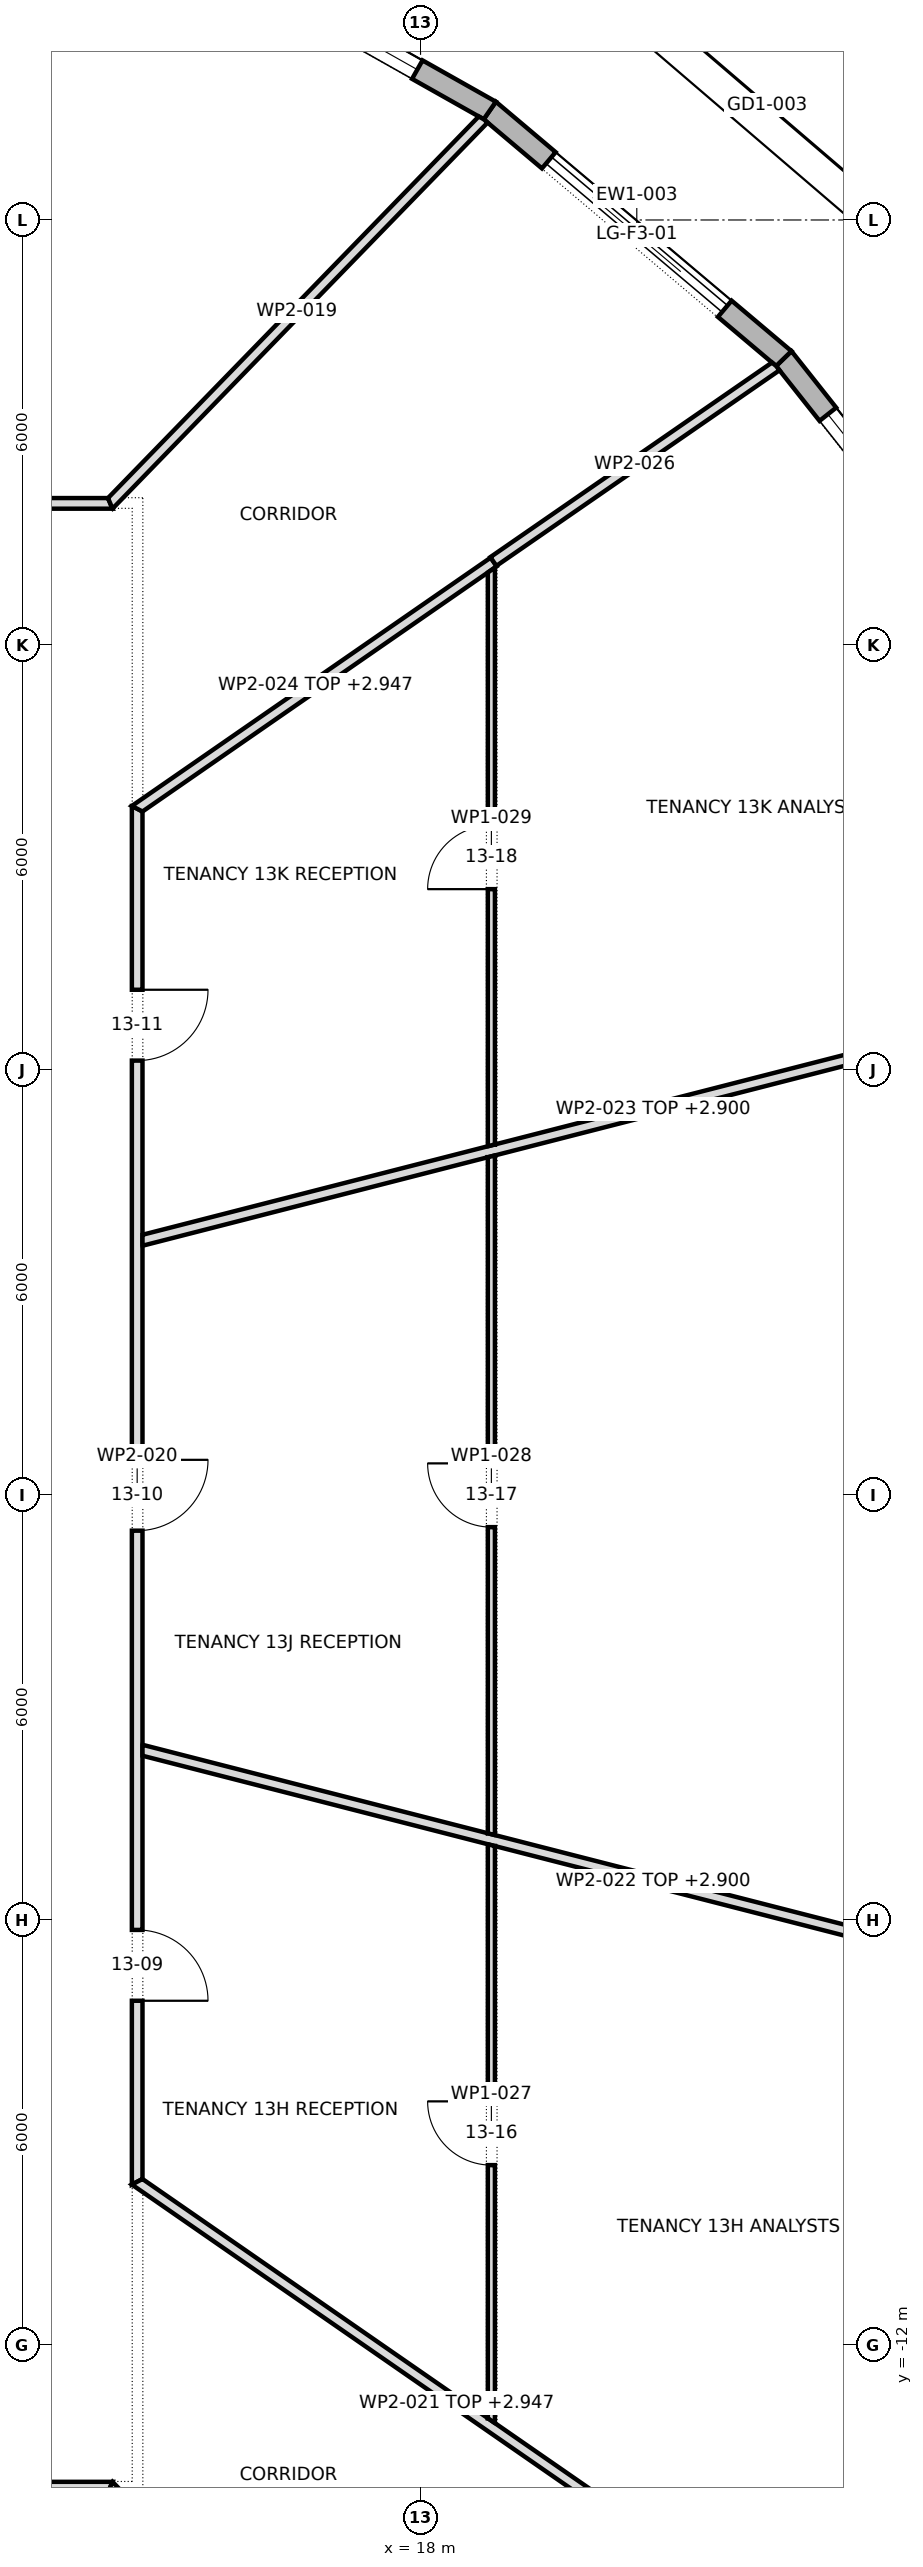
"""IFC4 building model, lengths in metres.
Left out: names, types, materials, properties, quantities, classifications, styles, units other than length and angle.
Written with IfcOpenShell. Run it as: python <this file> out.ifc"""

import sys

from ifc_helpers import new_model, si_unit, direction, frame, frame_2d, origin, place, context, subcontext, project, spatial, polyline, rectangle, outline, extrude, element, fill, save


model = new_model("IFC4")
c1 = context("Model", 3, precision=1e-05, world=origin(), true_north=direction((0.0, 1.0)))
c2 = subcontext(c1, "Body", "Model", "MODEL_VIEW")
j1 = project(units=[si_unit("LENGTHUNIT", "METRE"), si_unit("PLANEANGLEUNIT", "RADIAN")], contexts=[c1])
p1 = place(None, origin())
s1 = spatial("IfcSite", under=j1, at=p1, CompositionType="ELEMENT")
p2 = place(p1, origin())
s2 = spatial("IfcBuilding", under=s1, at=p2, CompositionType="ELEMENT")
p3 = place(p2, frame((0.0, 0.0, 198.9)))
s3 = spatial("IfcBuildingStorey", under=s2, at=p3, CompositionType="ELEMENT", Elevation=198.9)
p4 = place(p3, frame((26.39, 11.924, 0.0), z_axis=(0.0, 0.0, 1.0), x_axis=(-0.620829074232, 0.783945955145, 0.0)))
e1 = element("IfcWall", 1, at=p4, inside=s3, PredefinedType="STANDARD", context=c2, shape_type="SweptSolid", body=[
    extrude(outline(polyline([(-0.016, -0.15), (5.27, -0.15), (5.24, 0.15), (0.016, 0.15), (-0.016, -0.15)])), origin(), (0.0, 0.0, 1.0), 3.7),
])
p5 = place(p4, frame((1.003, 0.0, 0.6)))
e2 = element("IfcOpeningElement", 2, at=p5, cuts=e1, PredefinedType="OPENING", context=c2, shape_type="SweptSolid", body=[
    extrude(rectangle(XDim=3.25, YDim=2.65, at=frame_2d((1.625, 1.325))), frame((0.0, 0.162, 0.0), z_axis=(0.0, -1.0, 0.0), x_axis=(1.0, 0.0, 0.0)), (0.0, 0.0, 1.0), 0.324),
])
p6 = place(p3, frame((23.128, 16.044, 0.0), z_axis=(0.0, 0.0, 1.0), x_axis=(-0.764330261608, 0.644824977176, 0.0)))
e3 = element("IfcWall", 3, at=p6, inside=s3, PredefinedType="STANDARD", context=c2, shape_type="SweptSolid", body=[
    extrude(outline(polyline([(-0.015, -0.15), (5.444, -0.15), (5.416, 0.15), (0.015, 0.15), (-0.015, -0.15)])), origin(), (0.0, 0.0, 1.0), 3.7),
])
p7 = place(p6, frame((1.09, 0.0, 0.0)))
e4 = element("IfcOpeningElement", 4, at=p7, cuts=e3, PredefinedType="OPENING", context=c2, shape_type="SweptSolid", body=[
    extrude(rectangle(XDim=3.25, YDim=3.25, at=frame_2d((1.625, 1.625))), frame((0.0, 0.162, 0.0), z_axis=(0.0, -1.0, 0.0), x_axis=(1.0, 0.0, 0.0)), (0.0, 0.0, 1.0), 0.324),
])
p8 = place(p3, frame((18.977, 19.545, 0.0), z_axis=(0.0, 0.0, 1.0), x_axis=(-0.871083701819, 0.491134588912, 0.0)))
e5 = element("IfcWall", 5, at=p8, inside=s3, PredefinedType="STANDARD", context=c2, shape_type="SweptSolid", body=[
    extrude(outline(polyline([(-0.014, -0.15), (5.613, -0.15), (5.586, 0.15), (0.014, 0.15), (-0.014, -0.15)])), origin(), (0.0, 0.0, 1.0), 3.7),
])
p9 = place(p8, frame((1.175, 0.0, 0.6)))
e6 = element("IfcOpeningElement", 6, at=p9, cuts=e5, PredefinedType="OPENING", context=c2, shape_type="SweptSolid", body=[
    extrude(rectangle(XDim=3.25, YDim=2.65, at=frame_2d((1.625, 1.325))), frame((0.0, 0.162, 0.0), z_axis=(0.0, -1.0, 0.0), x_axis=(1.0, 0.0, 0.0)), (0.0, 0.0, 1.0), 0.324),
])
p10 = place(p3, frame((23.128, -16.044, 0.0), z_axis=(0.0, 0.0, 1.0), x_axis=(0.620829074232, 0.783945955145, 0.0)))
e7 = element("IfcWall", 7, at=p10, inside=s3, PredefinedType="STANDARD", context=c2, shape_type="SweptSolid", body=[
    extrude(outline(polyline([(-0.015, -0.15), (5.271, -0.15), (5.239, 0.15), (0.015, 0.15), (-0.015, -0.15)])), origin(), (0.0, 0.0, 1.0), 3.7),
])
p11 = place(p10, frame((1.003, 0.0, 0.6)))
e8 = element("IfcOpeningElement", 8, at=p11, cuts=e7, PredefinedType="OPENING", context=c2, shape_type="SweptSolid", body=[
    extrude(rectangle(XDim=3.25, YDim=2.65, at=frame_2d((1.625, 1.325))), frame((0.0, 0.162, 0.0), z_axis=(0.0, -1.0, 0.0), x_axis=(1.0, 0.0, 0.0)), (0.0, 0.0, 1.0), 0.324),
])
p12 = place(p3, frame((-13.652, 14.0, 0.0), z_axis=(0.0, 0.0, 1.0), x_axis=(1.0, 0.0, 0.0)))
e9 = element("IfcWall", 9, at=p12, inside=s3, PredefinedType="PARTITIONING", context=c2, shape_type="SweptSolid", body=[
    extrude(outline(polyline([(27.303, -0.075), (27.303, -0.075), (27.24, 0.075), (25.299, 0.075), (23.358, 0.075), (21.416, 0.075), (19.475, 0.075), (17.534, 0.075), (15.593, 0.075), (13.652, 0.075), (11.71, 0.075), (9.769, 0.075), (7.828, 0.075), (5.887, 0.075), (3.946, 0.075), (2.004, 0.075), (0.063, 0.075), (0.0, -0.075), (0.0, -0.075), (1.95, -0.075), (3.9, -0.075), (5.851, -0.075), (7.801, -0.075), (9.751, -0.075), (11.701, -0.075), (13.652, -0.075), (15.602, -0.075), (17.552, -0.075), (19.502, -0.075), (21.453, -0.075), (23.403, -0.075), (25.353, -0.075), (27.303, -0.075)])), origin(), (0.0, 0.0, 1.0), 3.7),
])
p13 = place(p12, frame((19.562, 0.0, 0.0)))
e10 = element("IfcOpeningElement", 10, at=p13, cuts=e9, PredefinedType="OPENING", context=c2, shape_type="SweptSolid", body=[
    extrude(rectangle(XDim=1.8, YDim=2.1, at=frame_2d((0.9, 1.05))), frame((0.0, 0.087, 0.0), z_axis=(0.0, -1.0, 0.0), x_axis=(1.0, 0.0, 0.0)), (0.0, 0.0, 1.0), 0.174),
])
p14 = place(p12, frame((5.942, 0.0, 0.0)))
e11 = element("IfcOpeningElement", 11, at=p14, cuts=e9, PredefinedType="OPENING", context=c2, shape_type="SweptSolid", body=[
    extrude(rectangle(XDim=1.8, YDim=2.1, at=frame_2d((0.9, 1.05))), frame((0.0, 0.087, 0.0), z_axis=(0.0, -1.0, 0.0), x_axis=(1.0, 0.0, 0.0)), (0.0, 0.0, 1.0), 0.174),
])
p15 = place(p3, frame((-1.63, -14.0, 0.0), z_axis=(0.0, 0.0, 1.0), x_axis=(1.0, 0.0, 0.0)))
e12 = element("IfcWall", 12, at=p15, inside=s3, PredefinedType="PARTITIONING", context=c2, shape_type="SweptSolid", body=[
    extrude(outline(polyline([(0.0, -0.075), (1.902, -0.075), (3.804, -0.075), (5.707, -0.075), (7.609, -0.075), (9.511, -0.075), (11.414, -0.075), (13.316, -0.075), (15.218, -0.075), (15.281, 0.075), (15.281, 0.075), (13.371, 0.075), (11.461, 0.075), (9.551, 0.075), (7.641, 0.075), (5.73, 0.075), (3.82, 0.075), (1.91, 0.075), (0.0, 0.075), (0.0, -0.075)])), origin(), (0.0, 0.0, 1.0), 3.7),
])
p16 = place(p15, frame((2.83, 0.0, 0.0)))
e13 = element("IfcOpeningElement", 13, at=p16, cuts=e12, PredefinedType="OPENING", context=c2, shape_type="SweptSolid", body=[
    extrude(rectangle(XDim=1.0, YDim=2.1, at=frame_2d((0.5, 1.05))), frame((0.0, 0.087, 0.0), z_axis=(0.0, -1.0, 0.0), x_axis=(1.0, 0.0, 0.0)), (0.0, 0.0, 1.0), 0.174),
])
p17 = place(p15, frame((10.455, 0.0, 0.0)))
e14 = element("IfcOpeningElement", 14, at=p17, cuts=e12, PredefinedType="OPENING", context=c2, shape_type="SweptSolid", body=[
    extrude(rectangle(XDim=1.0, YDim=2.1, at=frame_2d((0.5, 1.05))), frame((0.0, 0.087, 0.0), z_axis=(0.0, -1.0, 0.0), x_axis=(1.0, 0.0, 0.0)), (0.0, 0.0, 1.0), 0.174),
])
p18 = place(p3, frame((13.598, 13.977, 0.0), z_axis=(0.0, 0.0, 1.0), x_axis=(0.696864554069, 0.717202756048, 0.0)))
e15 = element("IfcWall", 15, at=p18, inside=s3, PredefinedType="PARTITIONING", context=c2, shape_type="SweptSolid", body=[
    extrude(outline(polyline([(7.599, -0.075), (7.599, -0.074), (7.594, -0.003), (7.573, 0.075), (5.696, 0.075), (3.818, 0.075), (1.941, 0.075), (0.063, 0.075), (0.032, 0.0), (0.0, -0.075), (1.9, -0.075), (3.799, -0.075), (5.699, -0.075), (7.599, -0.075)])), origin(), (0.0, 0.0, 1.0), 3.7),
])
p19 = place(p3, frame((14.0, -9.729, 0.0), z_axis=(0.0, 0.0, 1.0), x_axis=(0.0, 1.0, 0.0)))
e16 = element("IfcWall", 16, at=p19, inside=s3, PredefinedType="PARTITIONING", context=c2, shape_type="SweptSolid", body=[
    extrude(outline(polyline([(0.079, -0.075), (2.009, -0.075), (3.939, -0.075), (5.869, -0.075), (7.799, -0.075), (9.729, -0.075), (11.659, -0.075), (13.59, -0.075), (15.52, -0.075), (17.45, -0.075), (19.38, -0.075), (19.458, 0.075), (19.458, 0.075), (17.513, 0.075), (15.567, 0.075), (13.621, 0.075), (11.675, 0.075), (9.729, 0.075), (7.783, 0.075), (5.838, 0.075), (3.892, 0.075), (1.946, 0.075), (0.0, 0.075), (0.0, 0.075), (0.079, -0.075)])), origin(), (0.0, 0.0, 1.0), 3.7),
])
p20 = place(p19, frame((2.594, 0.0, 0.0)))
e17 = element("IfcOpeningElement", 17, at=p20, cuts=e16, PredefinedType="OPENING", context=c2, shape_type="SweptSolid", body=[
    extrude(rectangle(XDim=1.0, YDim=2.1, at=frame_2d((0.5, 1.05))), frame((0.0, 0.087, 0.0), z_axis=(0.0, -1.0, 0.0), x_axis=(1.0, 0.0, 0.0)), (0.0, 0.0, 1.0), 0.174),
])
p21 = place(p19, frame((9.229, 0.0, 0.0)))
e18 = element("IfcOpeningElement", 18, at=p21, cuts=e16, PredefinedType="OPENING", context=c2, shape_type="SweptSolid", body=[
    extrude(rectangle(XDim=1.0, YDim=2.1, at=frame_2d((0.5, 1.05))), frame((0.0, 0.087, 0.0), z_axis=(0.0, -1.0, 0.0), x_axis=(1.0, 0.0, 0.0)), (0.0, 0.0, 1.0), 0.174),
])
p22 = place(p19, frame((15.864, 0.0, 0.0)))
e19 = element("IfcOpeningElement", 19, at=p22, cuts=e16, PredefinedType="OPENING", context=c2, shape_type="SweptSolid", body=[
    extrude(rectangle(XDim=1.0, YDim=2.1, at=frame_2d((0.5, 1.05))), frame((0.0, 0.087, 0.0), z_axis=(0.0, -1.0, 0.0), x_axis=(1.0, 0.0, 0.0)), (0.0, 0.0, 1.0), 0.174),
])
p23 = place(p3, frame((13.968, -9.667, 0.0), z_axis=(0.0, 0.0, 1.0), x_axis=(0.822097241007, -0.569347105313, 0.0)))
e20 = element("IfcWall", 20, at=p23, inside=s3, PredefinedType="PARTITIONING", context=c2, shape_type="SweptSolid", body=[
    extrude(outline(polyline([(0.0, -0.075), (1.832, -0.075), (3.664, -0.075), (5.496, -0.075), (7.328, -0.075), (9.16, -0.075), (10.992, -0.075), (11.012, -0.002), (11.017, 0.07), (11.017, 0.075), (9.349, 0.075), (7.682, 0.075), (6.014, 0.075), (6.01, 0.072), (6.009, 0.075), (4.032, 0.075), (2.055, 0.075), (0.079, 0.075), (0.039, -0.0), (0.0, -0.075)])), origin(), (0.0, 0.0, 1.0), 2.947),
])
p24 = place(p3, frame((14.057, -3.594, 0.0), z_axis=(0.0, 0.0, 1.0), x_axis=(0.96870063855, -0.248231893342, 0.0)))
e21 = element("IfcWall", 21, at=p24, inside=s3, PredefinedType="PARTITIONING", context=c2, shape_type="SweptSolid", body=[
    extrude(outline(polyline([(0.038, -0.075), (1.748, -0.075), (3.458, -0.075), (5.168, -0.075), (5.174, -0.073), (5.174, -0.075), (7.117, -0.075), (9.061, -0.075), (11.004, -0.075), (12.947, -0.075), (14.89, -0.075), (14.904, -0.008), (14.904, 0.075), (12.931, 0.075), (10.958, 0.075), (8.985, 0.075), (7.011, 0.075), (5.038, 0.075), (5.033, 0.073), (5.032, 0.075), (3.355, 0.075), (1.677, 0.075), (0.0, 0.075), (0.0, 0.074), (0.038, -0.075)])), origin(), (0.0, 0.0, 1.0), 2.9),
])
p25 = place(p3, frame((14.057, 3.594, 0.0), z_axis=(0.0, 0.0, 1.0), x_axis=(0.96870063855, 0.248231893342, 0.0)))
e22 = element("IfcWall", 22, at=p25, inside=s3, PredefinedType="PARTITIONING", context=c2, shape_type="SweptSolid", body=[
    extrude(outline(polyline([(0.0, -0.075), (1.677, -0.075), (3.355, -0.075), (5.032, -0.075), (5.033, -0.073), (5.038, -0.075), (7.011, -0.075), (8.985, -0.075), (10.958, -0.075), (12.931, -0.075), (14.904, -0.075), (14.904, 0.008), (14.89, 0.075), (12.947, 0.075), (11.004, 0.075), (9.061, 0.075), (7.117, 0.075), (5.174, 0.075), (5.174, 0.073), (5.168, 0.075), (3.458, 0.075), (1.748, 0.075), (0.038, 0.075), (0.0, -0.074), (0.0, -0.075)])), origin(), (0.0, 0.0, 1.0), 2.9),
])
p26 = place(p3, frame((13.968, 9.667, 0.0), z_axis=(0.0, 0.0, 1.0), x_axis=(0.822290630684, 0.569067762827, 0.0)))
e23 = element("IfcWall", 23, at=p26, inside=s3, PredefinedType="PARTITIONING", context=c2, shape_type="SweptSolid", body=[
    extrude(outline(polyline([(6.16, 0.075), (4.62, 0.075), (3.08, 0.075), (1.54, 0.075), (0.0, 0.075), (0.079, -0.075), (1.599, -0.075), (3.119, -0.075), (4.64, -0.075), (6.16, -0.075), (6.16, 0.075)])), origin(), (0.0, 0.0, 1.0), 2.947),
])
p27 = place(p3, frame((18.893, -19.427, 0.0), z_axis=(0.0, 0.0, 1.0), x_axis=(-0.696864554069, 0.717202756048, 0.0)))
e24 = element("IfcWall", 24, at=p27, inside=s3, PredefinedType="PARTITIONING", context=c2, shape_type="SweptSolid", body=[
    extrude(outline(polyline([(0.0, -0.075), (1.9, -0.075), (3.799, -0.075), (5.699, -0.075), (7.599, -0.075), (7.567, 0.0), (7.535, 0.075), (5.658, 0.075), (3.78, 0.075), (1.903, 0.075), (0.025, 0.075), (0.005, -0.003), (0.0, -0.073), (0.0, -0.075)])), origin(), (0.0, 0.0, 1.0), 3.7),
])
p28 = place(p3, frame((19.028, 13.179, 0.0), z_axis=(0.0, 0.0, 1.0), x_axis=(0.822732902653, 0.568428158074, 0.0)))
e25 = element("IfcWall", 25, at=p28, inside=s3, PredefinedType="PARTITIONING", context=c2, shape_type="SweptSolid", body=[
    extrude(outline(polyline([(4.857, -0.075), (4.857, -0.068), (4.852, 0.002), (4.832, 0.075), (3.221, 0.075), (1.611, 0.075), (0.0, 0.075), (0.0, -0.04), (0.0, -0.075), (1.619, -0.075), (3.238, -0.075), (4.857, -0.075)])), origin(), (0.0, 0.0, 1.0), 3.7),
])
p29 = place(p3, frame((19.0, -4.926, 0.0), z_axis=(0.0, 0.0, 1.0), x_axis=(0.0, -1.0, 0.0)))
e26 = element("IfcWall", 26, at=p29, inside=s3, PredefinedType="PARTITIONING", context=c2, shape_type="SweptSolid", body=[
    extrude(outline(polyline([(0.0, -0.05), (1.62, -0.05), (3.24, -0.05), (4.86, -0.05), (6.481, -0.05), (8.101, -0.05), (8.169, 0.049), (8.169, 0.05), (6.541, 0.05), (4.912, 0.05), (3.283, 0.05), (1.654, 0.05), (0.025, 0.05), (0.0, -0.049), (0.0, -0.05)])), origin(), (0.0, 0.0, 1.0), 3.7),
])
p30 = place(p29, frame((3.629, 0.0, 0.0)))
e27 = element("IfcOpeningElement", 27, at=p30, cuts=e26, PredefinedType="OPENING", context=c2, shape_type="SweptSolid", body=[
    extrude(rectangle(XDim=0.9, YDim=2.1, at=frame_2d((0.45, 1.05))), frame((0.0, 0.062, 0.0), z_axis=(0.0, -1.0, 0.0), x_axis=(1.0, 0.0, 0.0)), (0.0, 0.0, 1.0), 0.124),
])
p31 = place(p3, frame((19.0, 4.796, 0.0), z_axis=(0.0, 0.0, 1.0), x_axis=(0.0, -1.0, 0.0)))
e28 = element("IfcWall", 28, at=p31, inside=s3, PredefinedType="PARTITIONING", context=c2, shape_type="SweptSolid", body=[
    extrude(outline(polyline([(0.025, -0.05), (1.934, -0.05), (3.842, -0.05), (5.75, -0.05), (7.659, -0.05), (9.567, -0.05), (9.593, 0.049), (9.593, 0.05), (7.674, 0.05), (5.756, 0.05), (3.837, 0.05), (1.918, 0.05), (0.0, 0.05), (0.0, 0.049), (0.025, -0.05)])), origin(), (0.0, 0.0, 1.0), 3.7),
])
p32 = place(p31, frame((4.346, 0.0, 0.0)))
e29 = element("IfcOpeningElement", 29, at=p32, cuts=e28, PredefinedType="OPENING", context=c2, shape_type="SweptSolid", body=[
    extrude(rectangle(XDim=0.9, YDim=2.1, at=frame_2d((0.45, 1.05))), frame((0.0, 0.062, 0.0), z_axis=(0.0, -1.0, 0.0), x_axis=(1.0, 0.0, 0.0)), (0.0, 0.0, 1.0), 0.124),
])
p33 = place(p3, frame((19.0, 13.093, 0.0), z_axis=(0.0, 0.0, 1.0), x_axis=(0.0, -1.0, 0.0)))
e30 = element("IfcWall", 30, at=p33, inside=s3, PredefinedType="PARTITIONING", context=c2, shape_type="SweptSolid", body=[
    extrude(outline(polyline([(8.167, -0.05), (8.167, -0.049), (8.142, 0.05), (6.513, 0.05), (4.885, 0.05), (3.257, 0.05), (1.628, 0.05), (0.0, 0.05), (0.0, 0.05), (0.069, -0.05), (1.688, -0.05), (3.308, -0.05), (4.928, -0.05), (6.547, -0.05), (8.167, -0.05)])), origin(), (0.0, 0.0, 1.0), 3.7),
])
p34 = place(p33, frame((3.638, 0.0, 0.0)))
e31 = element("IfcOpeningElement", 31, at=p34, cuts=e30, PredefinedType="OPENING", context=c2, shape_type="SweptSolid", body=[
    extrude(rectangle(XDim=0.9, YDim=2.1, at=frame_2d((0.45, 1.05))), frame((0.0, 0.062, 0.0), z_axis=(0.0, -1.0, 0.0), x_axis=(1.0, 0.0, 0.0)), (0.0, 0.0, 1.0), 0.124),
])
p35 = place(p5, origin())
e32 = element("IfcWindow", 32, at=p35, inside=s3, PartitioningType="TRIPLE_PANEL_VERTICAL", PredefinedType="WINDOW", context=c2, shape_type="SweptSolid", body=[
    extrude(rectangle(XDim=3.25, YDim=2.65, at=frame_2d((1.625, 1.325))), frame((0.0, 0.03, 0.0), z_axis=(0.0, -1.0, 0.0), x_axis=(1.0, 0.0, 0.0)), (0.0, 0.0, 1.0), 0.06),
])
fill(e2, e32)
p36 = place(p7, origin())
e33 = element("IfcDoor", 33, at=p36, inside=s3, OperationType="DOUBLE_DOOR_SLIDING", PredefinedType="DOOR", context=c2, shape_type="SweptSolid", body=[
    extrude(rectangle(XDim=3.25, YDim=3.25, at=frame_2d((1.625, 1.625))), frame((0.0, 0.025, 0.0), z_axis=(0.0, -1.0, 0.0), x_axis=(1.0, 0.0, 0.0)), (0.0, 0.0, 1.0), 0.05),
])
fill(e4, e33)
p37 = place(p9, origin())
e34 = element("IfcWindow", 34, at=p37, inside=s3, PartitioningType="TRIPLE_PANEL_VERTICAL", PredefinedType="WINDOW", context=c2, shape_type="SweptSolid", body=[
    extrude(rectangle(XDim=3.25, YDim=2.65, at=frame_2d((1.625, 1.325))), frame((0.0, 0.03, 0.0), z_axis=(0.0, -1.0, 0.0), x_axis=(1.0, 0.0, 0.0)), (0.0, 0.0, 1.0), 0.06),
])
fill(e6, e34)
p38 = place(p11, origin())
e35 = element("IfcWindow", 35, at=p38, inside=s3, PartitioningType="TRIPLE_PANEL_VERTICAL", PredefinedType="WINDOW", context=c2, shape_type="SweptSolid", body=[
    extrude(rectangle(XDim=3.25, YDim=2.65, at=frame_2d((1.625, 1.325))), frame((0.0, 0.03, 0.0), z_axis=(0.0, -1.0, 0.0), x_axis=(1.0, 0.0, 0.0)), (0.0, 0.0, 1.0), 0.06),
])
fill(e8, e35)
p39 = place(p20, frame((1.0, 0.0, 0.0), z_axis=(0.0, 0.0, 1.0), x_axis=(-1.0, 0.0, 0.0)))
e36 = element("IfcDoor", 36, at=p39, inside=s3, OperationType="SINGLE_SWING_LEFT", PredefinedType="DOOR", context=c2, shape_type="SweptSolid", body=[
    extrude(rectangle(XDim=1.0, YDim=2.1, at=frame_2d((0.5, 1.05))), frame((0.0, 0.025, 0.0), z_axis=(0.0, -1.0, 0.0), x_axis=(1.0, 0.0, 0.0)), (0.0, 0.0, 1.0), 0.05),
])
fill(e17, e36)
p40 = place(p21, frame((1.0, 0.0, 0.0), z_axis=(0.0, 0.0, 1.0), x_axis=(-1.0, 0.0, 0.0)))
e37 = element("IfcDoor", 37, at=p40, inside=s3, OperationType="SINGLE_SWING_RIGHT", PredefinedType="DOOR", context=c2, shape_type="SweptSolid", body=[
    extrude(rectangle(XDim=1.0, YDim=2.1, at=frame_2d((0.5, 1.05))), frame((0.0, 0.025, 0.0), z_axis=(0.0, -1.0, 0.0), x_axis=(1.0, 0.0, 0.0)), (0.0, 0.0, 1.0), 0.05),
])
fill(e18, e37)
p41 = place(p22, frame((1.0, 0.0, 0.0), z_axis=(0.0, 0.0, 1.0), x_axis=(-1.0, 0.0, 0.0)))
e38 = element("IfcDoor", 38, at=p41, inside=s3, OperationType="SINGLE_SWING_RIGHT", PredefinedType="DOOR", context=c2, shape_type="SweptSolid", body=[
    extrude(rectangle(XDim=1.0, YDim=2.1, at=frame_2d((0.5, 1.05))), frame((0.0, 0.025, 0.0), z_axis=(0.0, -1.0, 0.0), x_axis=(1.0, 0.0, 0.0)), (0.0, 0.0, 1.0), 0.05),
])
fill(e19, e38)
p42 = place(p30, frame((0.9, 0.0, 0.0), z_axis=(0.0, 0.0, 1.0), x_axis=(-1.0, 0.0, 0.0)))
e39 = element("IfcDoor", 39, at=p42, inside=s3, OperationType="SINGLE_SWING_LEFT", PredefinedType="DOOR", context=c2, shape_type="SweptSolid", body=[
    extrude(rectangle(XDim=0.9, YDim=2.1, at=frame_2d((0.45, 1.05))), frame((0.0, 0.025, 0.0), z_axis=(0.0, -1.0, 0.0), x_axis=(1.0, 0.0, 0.0)), (0.0, 0.0, 1.0), 0.05),
])
fill(e27, e39)
p43 = place(p32, frame((0.9, 0.0, 0.0), z_axis=(0.0, 0.0, 1.0), x_axis=(-1.0, 0.0, 0.0)))
e40 = element("IfcDoor", 40, at=p43, inside=s3, OperationType="SINGLE_SWING_LEFT", PredefinedType="DOOR", context=c2, shape_type="SweptSolid", body=[
    extrude(rectangle(XDim=0.9, YDim=2.1, at=frame_2d((0.45, 1.05))), frame((0.0, 0.025, 0.0), z_axis=(0.0, -1.0, 0.0), x_axis=(1.0, 0.0, 0.0)), (0.0, 0.0, 1.0), 0.05),
])
fill(e29, e40)
p44 = place(p34, frame((0.9, 0.0, 0.0), z_axis=(0.0, 0.0, 1.0), x_axis=(-1.0, 0.0, 0.0)))
e41 = element("IfcDoor", 41, at=p44, inside=s3, OperationType="SINGLE_SWING_RIGHT", PredefinedType="DOOR", context=c2, shape_type="SweptSolid", body=[
    extrude(rectangle(XDim=0.9, YDim=2.1, at=frame_2d((0.45, 1.05))), frame((0.0, 0.025, 0.0), z_axis=(0.0, -1.0, 0.0), x_axis=(1.0, 0.0, 0.0)), (0.0, 0.0, 1.0), 0.05),
])
fill(e31, e41)
save(model, sys.argv[1])
